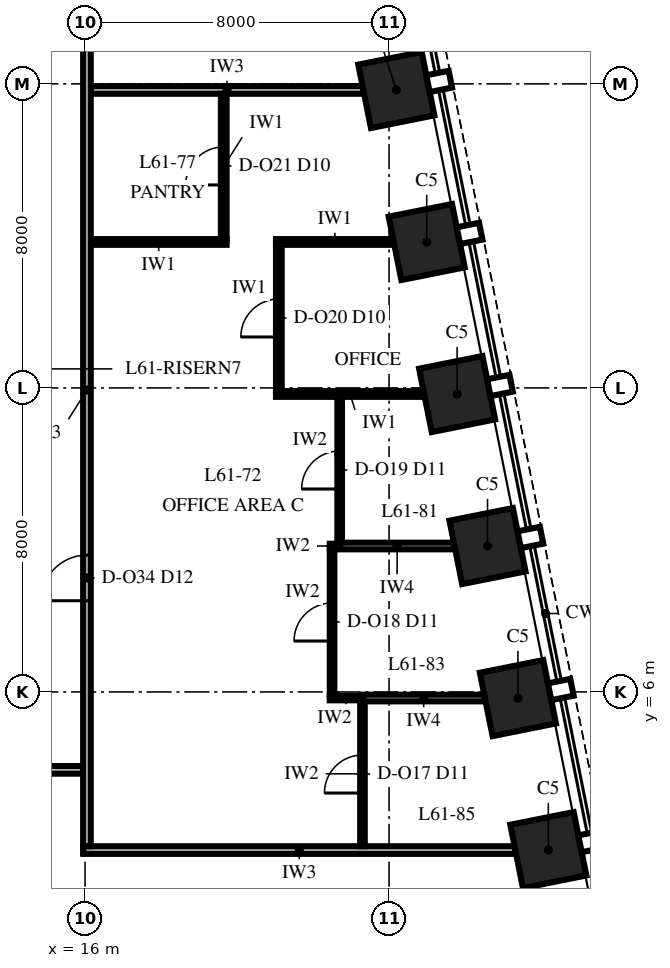
"""IFC4 building model, lengths in metres.
Left out: names, types, materials, properties, quantities, classifications, styles, units other than length and angle.
Written with IfcOpenShell. Run it as: python <this file> out.ifc"""

import sys

from ifc_helpers import new_model, si_unit, direction, frame, frame_2d, origin, origin_2d, place, context, subcontext, project, spatial, rectangle, extrude, element, fill, save


model = new_model("IFC4")
c1 = context("Model", 3, precision=1e-05, world=origin(), true_north=direction((0.0, 1.0)))
c2 = subcontext(c1, "Body", "Model", "MODEL_VIEW")
j1 = project(units=[si_unit("LENGTHUNIT", "METRE"), si_unit("PLANEANGLEUNIT", "RADIAN")], contexts=[c1])
p1 = place(None, origin())
s1 = spatial("IfcSite", under=j1, at=p1, CompositionType="ELEMENT")
p2 = place(p1, origin())
s2 = spatial("IfcBuilding", under=s1, at=p2, CompositionType="ELEMENT")
p3 = place(p2, frame((0.0, 0.0, 264.0)))
s3 = spatial("IfcBuildingStorey", under=s2, at=p3, CompositionType="ELEMENT", Elevation=264.0)
for number, where, z_axis, x_axis in (
    (1, (28.191, 1.838, 0.0), (0.0, 0.0, 1.0), (-0.196, 0.981, 0.0)),
    (2, (27.391, 5.838, 0.0), (0.0, 0.0, 1.0), (-0.196, 0.981, 0.0)),
    (3, (26.591, 9.838, 0.0), (0.0, 0.0, 1.0), (-0.196, 0.981, 0.0)),
    (4, (25.791, 13.838, 0.0), (0.0, 0.0, 1.0), (-0.196, 0.981, 0.0)),
    (5, (24.991, 17.838, 0.0), (0.0, 0.0, 1.0), (-0.196, 0.981, 0.0)),
    (6, (24.191, 21.838, 0.0), (0.0, 0.0, 1.0), (-0.196, 0.981, 0.0)),
):
    element("IfcColumn", number, at=place(p3, frame(where, z_axis=z_axis, x_axis=x_axis)), inside=s3, PredefinedType="COLUMN", context=c2, shape_type="SweptSolid", body=[
        extrude(rectangle(XDim=1.7, YDim=1.7, at=origin_2d()), origin(), (0.0, 0.0, 1.0), 4.0),
    ])
p4 = place(p3, frame((15.95, 1.84, 0.0), z_axis=(0.0, 0.0, 1.0), x_axis=(1.0, 0.0, 0.0)))
e7 = element("IfcWall", 7, at=p4, inside=s3, PredefinedType="PARTITIONING", context=c2, shape_type="SweptSolid", body=[
    extrude(rectangle(XDim=11.374, YDim=0.2, at=frame_2d((5.687, 0.0))), origin(), (0.0, 0.0, 1.0), 3.23),
])
p5 = place(p3, frame((-15.95, 3.95, 0.0), z_axis=(0.0, 0.0, 1.0), x_axis=(1.0, 0.0, 0.0)))
e8 = element("IfcWall", 8, at=p5, inside=s3, PredefinedType="PARTITIONING", context=c2, shape_type="SweptSolid", body=[
    extrude(rectangle(XDim=31.9, YDim=0.2, at=frame_2d((15.95, 0.0))), origin(), (0.0, 0.0, 1.0), 3.23),
])
p6 = place(p5, frame((7.35, 0.0, 0.0)))
e9 = element("IfcOpeningElement", 9, at=p6, cuts=e8, PredefinedType="OPENING", context=c2, shape_type="SweptSolid", body=[
    extrude(rectangle(XDim=1.2, YDim=2.4, at=frame_2d((0.6, 1.2))), frame((0.0, 0.115, 0.0), z_axis=(0.0, -1.0, 0.0), x_axis=(1.0, 0.0, 0.0)), (0.0, 0.0, 1.0), 0.23),
])
p7 = place(p5, frame((23.35, 0.0, 0.0)))
e10 = element("IfcOpeningElement", 10, at=p7, cuts=e8, PredefinedType="OPENING", context=c2, shape_type="SweptSolid", body=[
    extrude(rectangle(XDim=1.2, YDim=2.4, at=frame_2d((0.6, 1.2))), frame((0.0, 0.115, 0.0), z_axis=(0.0, -1.0, 0.0), x_axis=(1.0, 0.0, 0.0)), (0.0, 0.0, 1.0), 0.23),
])
p8 = place(p3, frame((22.44, 5.84, 0.0), z_axis=(0.0, 0.0, 1.0), x_axis=(1.0, 0.0, 0.0)))
e11 = element("IfcWall", 11, at=p8, inside=s3, PredefinedType="PARTITIONING", context=c2, shape_type="SweptSolid", body=[
    extrude(rectangle(XDim=0.86, YDim=0.12, at=frame_2d((0.43, 0.0))), origin(), (0.0, 0.0, 1.0), 2.842),
])
p9 = place(p3, frame((23.3, 5.84, 0.0), z_axis=(0.0, 0.0, 1.0), x_axis=(1.0, 0.0, 0.0)))
e12 = element("IfcWall", 12, at=p9, inside=s3, PredefinedType="PARTITIONING", context=c2, shape_type="SweptSolid", body=[
    extrude(rectangle(XDim=3.224, YDim=0.175, at=frame_2d((1.612, 0.0))), origin(), (0.0, 0.0, 1.0), 2.842),
])
p10 = place(p3, frame((22.44, 9.84, 0.0), z_axis=(0.0, 0.0, 1.0), x_axis=(1.0, 0.0, 0.0)))
e13 = element("IfcWall", 13, at=p10, inside=s3, PredefinedType="PARTITIONING", context=c2, shape_type="SweptSolid", body=[
    extrude(rectangle(XDim=0.26, YDim=0.12, at=frame_2d((0.13, 0.0))), origin(), (0.0, 0.0, 1.0), 3.85),
])
p11 = place(p3, frame((22.7, 9.84, 0.0), z_axis=(0.0, 0.0, 1.0), x_axis=(1.0, 0.0, 0.0)))
e14 = element("IfcWall", 14, at=p11, inside=s3, PredefinedType="PARTITIONING", context=c2, shape_type="SweptSolid", body=[
    extrude(rectangle(XDim=3.024, YDim=0.175, at=frame_2d((1.512, 0.0))), origin(), (0.0, 0.0, 1.0), 3.23),
])
p12 = place(p3, frame((21.025, 13.84, 0.0), z_axis=(0.0, 0.0, 1.0), x_axis=(1.0, 0.0, 0.0)))
e15 = element("IfcWall", 15, at=p12, inside=s3, PredefinedType="PARTITIONING", context=c2, shape_type="SweptSolid", body=[
    extrude(rectangle(XDim=3.899, YDim=0.15, at=frame_2d((1.949, 0.0))), origin(), (0.0, 0.0, 1.0), 3.23),
])
p13 = place(p3, frame((16.15, 17.84, 0.0), z_axis=(0.0, 0.0, 1.0), x_axis=(1.0, 0.0, 0.0)))
e16 = element("IfcWall", 16, at=p13, inside=s3, PredefinedType="PARTITIONING", context=c2, shape_type="SweptSolid", body=[
    extrude(rectangle(XDim=3.575, YDim=0.15, at=frame_2d((1.788, 0.0))), origin(), (0.0, 0.0, 1.0), 3.23),
])
p14 = place(p3, frame((21.025, 17.84, 0.0), z_axis=(0.0, 0.0, 1.0), x_axis=(1.0, 0.0, 0.0)))
e17 = element("IfcWall", 17, at=p14, inside=s3, PredefinedType="PARTITIONING", context=c2, shape_type="SweptSolid", body=[
    extrude(rectangle(XDim=3.099, YDim=0.15, at=frame_2d((1.549, 0.0))), origin(), (0.0, 0.0, 1.0), 3.23),
])
p15 = place(p3, frame((16.15, 21.84, 0.0), z_axis=(0.0, 0.0, 1.0), x_axis=(1.0, 0.0, 0.0)))
e18 = element("IfcWall", 18, at=p15, inside=s3, PredefinedType="PARTITIONING", context=c2, shape_type="SweptSolid", body=[
    extrude(rectangle(XDim=7.174, YDim=0.2, at=frame_2d((3.587, 0.0))), origin(), (0.0, 0.0, 1.0), 3.23),
])
p16 = place(p3, frame((16.05, 1.94, 0.0), z_axis=(0.0, 0.0, 1.0), x_axis=(0.0, 1.0, 0.0)))
e19 = element("IfcWall", 19, at=p16, inside=s3, PredefinedType="PARTITIONING", context=c2, shape_type="SweptSolid", body=[
    extrude(rectangle(XDim=24.01, YDim=0.2, at=frame_2d((12.005, 0.0))), origin(), (0.0, 0.0, 1.0), 2.842),
])
p17 = place(p16, frame((22.46, 0.0, 0.0)))
e20 = element("IfcOpeningElement", 20, at=p17, cuts=e19, PredefinedType="OPENING", context=c2, shape_type="SweptSolid", body=[
    extrude(rectangle(XDim=1.2, YDim=2.4, at=frame_2d((0.6, 1.2))), frame((0.0, 0.115, 0.0), z_axis=(0.0, -1.0, 0.0), x_axis=(1.0, 0.0, 0.0)), (0.0, 0.0, 1.0), 0.23),
])
p18 = place(p16, frame((6.46, 0.0, 0.0)))
e21 = element("IfcOpeningElement", 21, at=p18, cuts=e19, PredefinedType="OPENING", context=c2, shape_type="SweptSolid", body=[
    extrude(rectangle(XDim=1.2, YDim=2.4, at=frame_2d((0.6, 1.2))), frame((0.0, 0.115, 0.0), z_axis=(0.0, -1.0, 0.0), x_axis=(1.0, 0.0, 0.0)), (0.0, 0.0, 1.0), 0.23),
])
p19 = place(p3, frame((19.65, 17.915, 0.0), z_axis=(0.0, 0.0, 1.0), x_axis=(0.0, 1.0, 0.0)))
e22 = element("IfcWall", 22, at=p19, inside=s3, PredefinedType="PARTITIONING", context=c2, shape_type="SweptSolid", body=[
    extrude(rectangle(XDim=3.825, YDim=0.15, at=frame_2d((1.913, 0.0))), origin(), (0.0, 0.0, 1.0), 3.23),
])
p20 = place(p19, frame((1.425, 0.0, 0.0)))
e23 = element("IfcOpeningElement", 23, at=p20, cuts=e22, PredefinedType="OPENING", context=c2, shape_type="SweptSolid", body=[
    extrude(rectangle(XDim=1.0, YDim=2.3, at=frame_2d((0.5, 1.15))), frame((0.0, 0.09, 0.0), z_axis=(0.0, -1.0, 0.0), x_axis=(1.0, 0.0, 0.0)), (0.0, 0.0, 1.0), 0.18),
])
p21 = place(p3, frame((21.1, 13.915, 0.0), z_axis=(0.0, 0.0, 1.0), x_axis=(0.0, 1.0, 0.0)))
e24 = element("IfcWall", 24, at=p21, inside=s3, PredefinedType="PARTITIONING", context=c2, shape_type="SweptSolid", body=[
    extrude(rectangle(XDim=3.85, YDim=0.15, at=frame_2d((1.925, 0.0))), origin(), (0.0, 0.0, 1.0), 3.23),
])
p22 = place(p21, frame((1.425, 0.0, 0.0)))
e25 = element("IfcOpeningElement", 25, at=p22, cuts=e24, PredefinedType="OPENING", context=c2, shape_type="SweptSolid", body=[
    extrude(rectangle(XDim=1.0, YDim=2.3, at=frame_2d((0.5, 1.15))), frame((0.0, 0.09, 0.0), z_axis=(0.0, -1.0, 0.0), x_axis=(1.0, 0.0, 0.0)), (0.0, 0.0, 1.0), 0.18),
])
p23 = place(p3, frame((22.5, 5.9, 0.0), z_axis=(0.0, 0.0, 1.0), x_axis=(0.0, 1.0, 0.0)))
e26 = element("IfcWall", 26, at=p23, inside=s3, PredefinedType="PARTITIONING", context=c2, shape_type="SweptSolid", body=[
    extrude(rectangle(XDim=3.88, YDim=0.12, at=frame_2d((1.94, 0.0))), origin(), (0.0, 0.0, 1.0), 2.842),
])
p24 = place(p23, frame((1.44, 0.0, 0.0)))
e27 = element("IfcOpeningElement", 27, at=p24, cuts=e26, PredefinedType="OPENING", context=c2, shape_type="SweptSolid", body=[
    extrude(rectangle(XDim=1.0, YDim=2.4, at=frame_2d((0.5, 1.2))), frame((0.0, 0.075, 0.0), z_axis=(0.0, -1.0, 0.0), x_axis=(1.0, 0.0, 0.0)), (0.0, 0.0, 1.0), 0.15),
])
p25 = place(p3, frame((22.7, 9.927, 0.0), z_axis=(0.0, 0.0, 1.0), x_axis=(0.0, 1.0, 0.0)))
e28 = element("IfcWall", 28, at=p25, inside=s3, PredefinedType="PARTITIONING", context=c2, shape_type="SweptSolid", body=[
    extrude(rectangle(XDim=3.837, YDim=0.12, at=frame_2d((1.919, 0.0))), origin(), (0.0, 0.0, 1.0), 3.85),
])
p26 = place(p25, frame((1.413, 0.0, 0.0)))
e29 = element("IfcOpeningElement", 29, at=p26, cuts=e28, PredefinedType="OPENING", context=c2, shape_type="SweptSolid", body=[
    extrude(rectangle(XDim=1.0, YDim=2.4, at=frame_2d((0.5, 1.2))), frame((0.0, 0.075, 0.0), z_axis=(0.0, -1.0, 0.0), x_axis=(1.0, 0.0, 0.0)), (0.0, 0.0, 1.0), 0.15),
])
p27 = place(p3, frame((23.3, 1.94, 0.0), z_axis=(0.0, 0.0, 1.0), x_axis=(0.0, 1.0, 0.0)))
e30 = element("IfcWall", 30, at=p27, inside=s3, PredefinedType="PARTITIONING", context=c2, shape_type="SweptSolid", body=[
    extrude(rectangle(XDim=3.812, YDim=0.12, at=frame_2d((1.906, 0.0))), origin(), (0.0, 0.0, 1.0), 3.85),
])
p28 = place(p27, frame((1.4, 0.0, 0.0)))
e31 = element("IfcOpeningElement", 31, at=p28, cuts=e30, PredefinedType="OPENING", context=c2, shape_type="SweptSolid", body=[
    extrude(rectangle(XDim=1.0, YDim=2.4, at=frame_2d((0.5, 1.2))), frame((0.0, 0.075, 0.0), z_axis=(0.0, -1.0, 0.0), x_axis=(1.0, 0.0, 0.0)), (0.0, 0.0, 1.0), 0.15),
])
p29 = place(p28, origin())
e32 = element("IfcDoor", 32, at=p29, inside=s3, OperationType="SINGLE_SWING_RIGHT", PredefinedType="DOOR", context=c2, shape_type="SweptSolid", body=[
    extrude(rectangle(XDim=1.0, YDim=2.4, at=frame_2d((0.5, 1.2))), frame((0.0, 0.06, 0.0), z_axis=(0.0, -1.0, 0.0), x_axis=(1.0, 0.0, 0.0)), (0.0, 0.0, 1.0), 0.12),
])
fill(e31, e32)
p30 = place(p24, origin())
e33 = element("IfcDoor", 33, at=p30, inside=s3, OperationType="SINGLE_SWING_RIGHT", PredefinedType="DOOR", context=c2, shape_type="SweptSolid", body=[
    extrude(rectangle(XDim=1.0, YDim=2.4, at=frame_2d((0.5, 1.2))), frame((0.0, 0.06, 0.0), z_axis=(0.0, -1.0, 0.0), x_axis=(1.0, 0.0, 0.0)), (0.0, 0.0, 1.0), 0.12),
])
fill(e27, e33)
p31 = place(p26, origin())
e34 = element("IfcDoor", 34, at=p31, inside=s3, OperationType="SINGLE_SWING_RIGHT", PredefinedType="DOOR", context=c2, shape_type="SweptSolid", body=[
    extrude(rectangle(XDim=1.0, YDim=2.4, at=frame_2d((0.5, 1.2))), frame((0.0, 0.06, 0.0), z_axis=(0.0, -1.0, 0.0), x_axis=(1.0, 0.0, 0.0)), (0.0, 0.0, 1.0), 0.12),
])
fill(e29, e34)
p32 = place(p22, origin())
e35 = element("IfcDoor", 35, at=p32, inside=s3, OperationType="SINGLE_SWING_LEFT", PredefinedType="DOOR", context=c2, shape_type="SweptSolid", body=[
    extrude(rectangle(XDim=1.0, YDim=2.3, at=frame_2d((0.5, 1.15))), frame((0.0, 0.075, 0.0), z_axis=(0.0, -1.0, 0.0), x_axis=(1.0, 0.0, 0.0)), (0.0, 0.0, 1.0), 0.149),
])
fill(e25, e35)
p33 = place(p20, origin())
e36 = element("IfcDoor", 36, at=p33, inside=s3, OperationType="SINGLE_SWING_LEFT", PredefinedType="DOOR", context=c2, shape_type="SweptSolid", body=[
    extrude(rectangle(XDim=1.0, YDim=2.3, at=frame_2d((0.5, 1.15))), frame((0.0, 0.075, 0.0), z_axis=(0.0, -1.0, 0.0), x_axis=(1.0, 0.0, 0.0)), (0.0, 0.0, 1.0), 0.149),
])
fill(e23, e36)
p34 = place(p18, origin())
e37 = element("IfcDoor", 37, at=p34, inside=s3, OperationType="SINGLE_SWING_LEFT", PredefinedType="DOOR", context=c2, shape_type="SweptSolid", body=[
    extrude(rectangle(XDim=1.2, YDim=2.4, at=frame_2d((0.6, 1.2))), frame((0.0, 0.1, 0.0), z_axis=(0.0, -1.0, 0.0), x_axis=(1.0, 0.0, 0.0)), (0.0, 0.0, 1.0), 0.199),
])
fill(e21, e37)
save(model, sys.argv[1])
